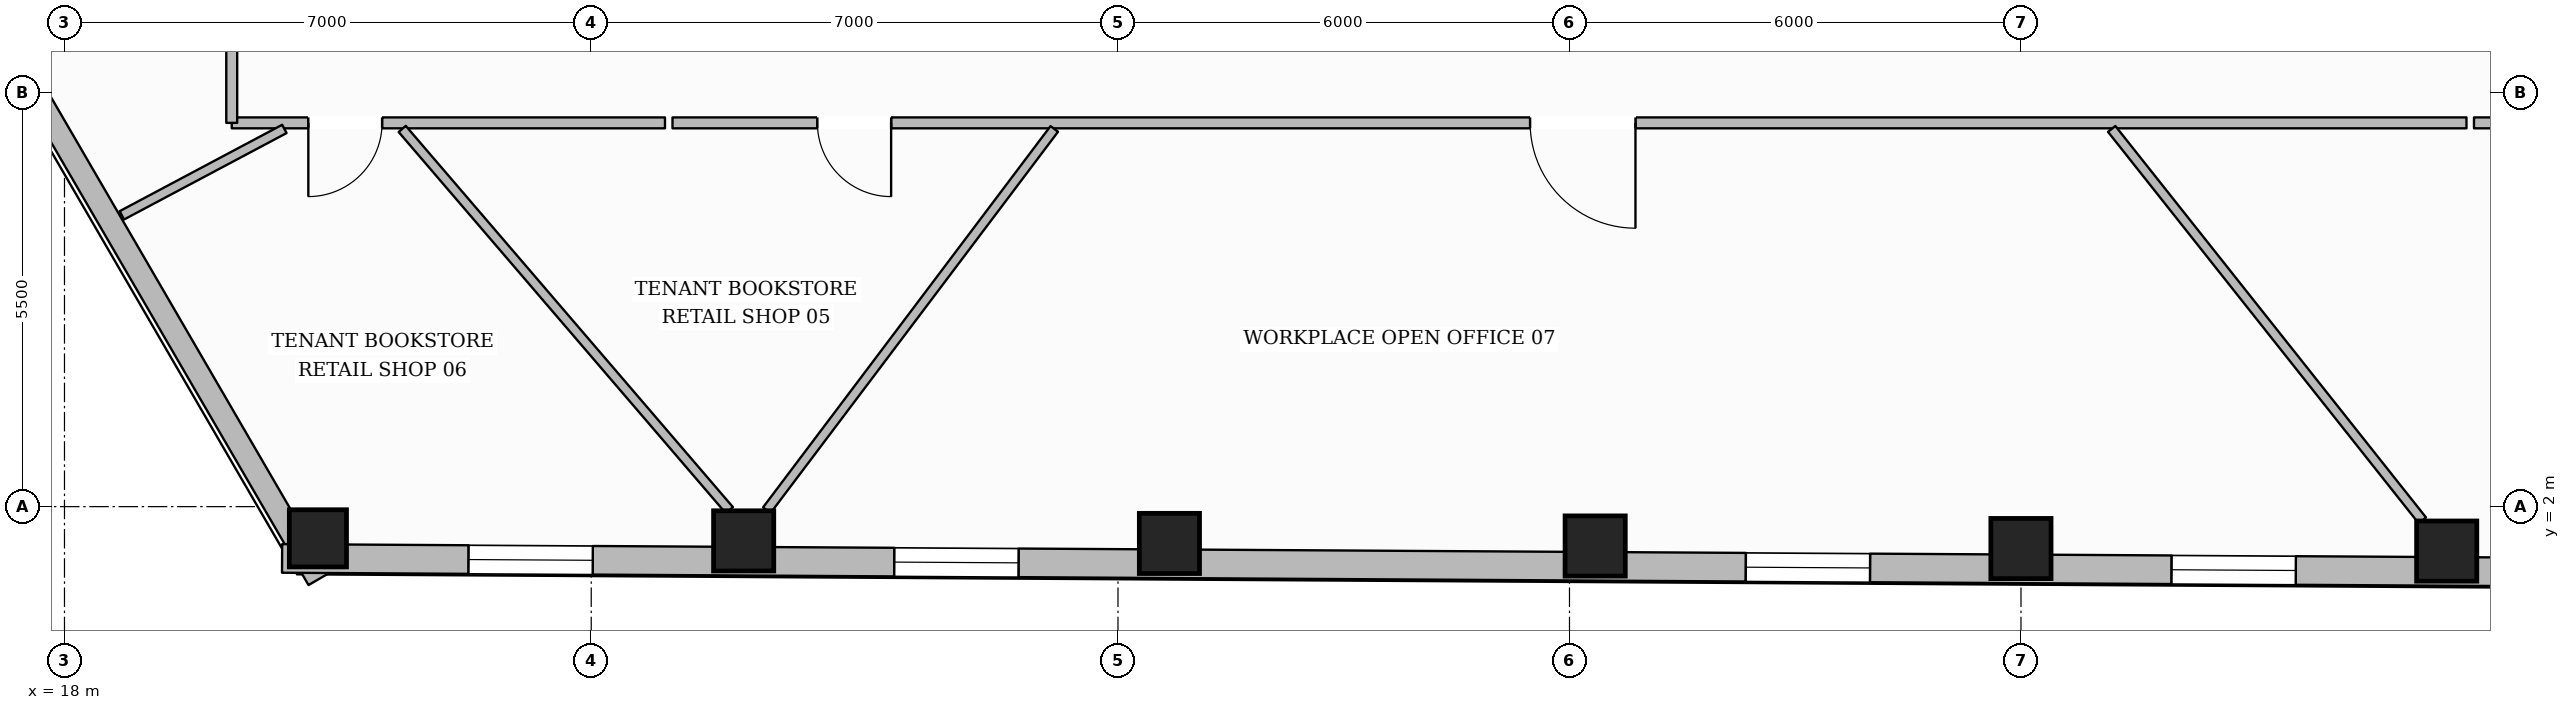
"""IFC4 building model, lengths in metres.
Left out: names, types, materials, properties, quantities, classifications, styles, units other than length and angle.
Written with IfcOpenShell. Run it as: python <this file> out.ifc"""

import sys

from ifc_helpers import new_model, si_unit, direction, frame, frame_2d, origin, origin_2d, place, context, subcontext, project, spatial, rectangle, hollow_rectangle, extrude, element, fill, save


model = new_model("IFC4")
c1 = context("Model", 3, precision=1e-05, world=origin(), true_north=direction((0.0, 1.0)))
c2 = subcontext(c1, "Body", "Model", "MODEL_VIEW")
j1 = project(units=[si_unit("LENGTHUNIT", "METRE"), si_unit("PLANEANGLEUNIT", "RADIAN")], contexts=[c1])
p1 = place(None, origin())
s1 = spatial("IfcSite", under=j1, at=p1, CompositionType="ELEMENT")
p2 = place(p1, origin())
s2 = spatial("IfcBuilding", under=s1, at=p2, CompositionType="ELEMENT")
p3 = place(p2, frame((0.0, 0.0, 44.5)))
s3 = spatial("IfcBuildingStorey", under=s2, at=p3, CompositionType="ELEMENT", Elevation=44.5)
p4 = place(p3, frame((21.368, 1.579, 0.0), z_axis=(0.0, 0.0, 1.0), x_axis=(1.0, 0.0, 0.0)))
e1 = element("IfcColumn", 1, at=p4, inside=s3, PredefinedType="COLUMN", context=c2, shape_type="SweptSolid", body=[
    extrude(hollow_rectangle(XDim=0.76, YDim=0.76, WallThickness=0.035, at=origin_2d()), origin(), (0.0, 0.0, 1.0), 3.59),
])
for number, where, z_axis, x_axis in (
    (2, (27.026, 1.545, 0.0), (0.0, 0.0, 1.0), (1.0, 0.0, 0.0)),
    (3, (32.684, 1.511, 0.0), (0.0, 0.0, 1.0), (1.0, 0.0, 0.0)),
    (4, (38.341, 1.477, 0.0), (0.0, 0.0, 1.0), (1.0, 0.0, 0.0)),
    (5, (44.0, 1.443, 0.0), (0.0, 0.0, 1.0), (1.0, 0.0, 0.0)),
    (6, (49.657, 1.409, 0.0), (0.0, 0.0, 1.0), (1.0, 0.0, 0.0)),
):
    element("IfcColumn", number, at=place(p3, frame(where, z_axis=z_axis, x_axis=x_axis)), inside=s3, PredefinedType="COLUMN", context=c2, shape_type="SweptSolid", body=[
        extrude(hollow_rectangle(XDim=0.8, YDim=0.8, WallThickness=0.036, at=origin_2d()), origin(), (0.0, 0.0, 1.0), 3.59),
    ])
p5 = place(p3, frame((21.373, 1.033, 0.0), z_axis=(0.0, 0.0, 1.0), x_axis=(-0.502582346065, 0.864529343298, 0.0)))
e7 = element("IfcWall", 7, at=p5, inside=s3, PredefinedType="STANDARD", context=c2, shape_type="SweptSolid", body=[
    extrude(rectangle(XDim=16.145, YDim=0.3, at=frame_2d((8.072, 0.0))), origin(), (0.0, 0.0, 1.0), 2.97),
])
p6 = place(p5, frame((7.472, 0.0, 0.65)))
e8 = element("IfcOpeningElement", 8, at=p6, cuts=e7, PredefinedType="OPENING", context=c2, shape_type="SweptSolid", body=[
    extrude(rectangle(XDim=1.2, YDim=1.7, at=frame_2d((0.6, 0.85))), frame((0.0, 0.16, 0.0), z_axis=(0.0, -1.0, 0.0), x_axis=(1.0, 0.0, 0.0)), (0.0, 0.0, 1.0), 0.32),
])
p7 = place(p3, frame((55.794, 1.103, 0.0), z_axis=(0.0, 0.0, 1.0), x_axis=(-0.999982073771, 0.005987665294, 0.0)))
e9 = element("IfcWall", 9, at=p7, inside=s3, PredefinedType="STANDARD", context=c2, shape_type="SweptSolid", body=[
    extrude(rectangle(XDim=34.903, YDim=0.38, at=frame_2d((17.451, 0.0))), origin(), (0.0, 0.0, 1.0), 2.97),
])
p8 = place(p7, frame((30.774, 0.0, 0.65)))
e10 = element("IfcOpeningElement", 10, at=p8, cuts=e9, PredefinedType="OPENING", context=c2, shape_type="SweptSolid", body=[
    extrude(rectangle(XDim=1.65, YDim=1.75, at=frame_2d((0.825, 0.875))), frame((0.0, 0.2, 0.0), z_axis=(0.0, -1.0, 0.0), x_axis=(1.0, 0.0, 0.0)), (0.0, 0.0, 1.0), 0.4),
])
p9 = place(p7, frame((25.116, 0.0, 0.65)))
e11 = element("IfcOpeningElement", 11, at=p9, cuts=e9, PredefinedType="OPENING", context=c2, shape_type="SweptSolid", body=[
    extrude(rectangle(XDim=1.65, YDim=1.75, at=frame_2d((0.825, 0.875))), frame((0.0, 0.2, 0.0), z_axis=(0.0, -1.0, 0.0), x_axis=(1.0, 0.0, 0.0)), (0.0, 0.0, 1.0), 0.4),
])
p10 = place(p7, frame((13.8, 0.0, 0.65)))
e12 = element("IfcOpeningElement", 12, at=p10, cuts=e9, PredefinedType="OPENING", context=c2, shape_type="SweptSolid", body=[
    extrude(rectangle(XDim=1.65, YDim=1.75, at=frame_2d((0.825, 0.875))), frame((0.0, 0.2, 0.0), z_axis=(0.0, -1.0, 0.0), x_axis=(1.0, 0.0, 0.0)), (0.0, 0.0, 1.0), 0.4),
])
p11 = place(p7, frame((8.142, 0.0, 0.65)))
e13 = element("IfcOpeningElement", 13, at=p11, cuts=e9, PredefinedType="OPENING", context=c2, shape_type="SweptSolid", body=[
    extrude(rectangle(XDim=1.65, YDim=1.75, at=frame_2d((0.825, 0.875))), frame((0.0, 0.2, 0.0), z_axis=(0.0, -1.0, 0.0), x_axis=(1.0, 0.0, 0.0)), (0.0, 0.0, 1.0), 0.4),
])
p12 = place(p7, frame((2.484, 0.0, 0.65)))
e14 = element("IfcOpeningElement", 14, at=p12, cuts=e9, PredefinedType="OPENING", context=c2, shape_type="SweptSolid", body=[
    extrude(rectangle(XDim=1.65, YDim=1.75, at=frame_2d((0.825, 0.875))), frame((0.0, 0.2, 0.0), z_axis=(0.0, -1.0, 0.0), x_axis=(1.0, 0.0, 0.0)), (0.0, 0.0, 1.0), 0.4),
])
p13 = place(p3, frame((56.528, 7.1, 0.0), z_axis=(0.0, 0.0, 1.0), x_axis=(-1.0, 0.0, 0.0)))
e15 = element("IfcWall", 15, at=p13, inside=s3, PredefinedType="PARTITIONING", context=c2, shape_type="SweptSolid", body=[
    extrude(rectangle(XDim=6.508, YDim=0.145, at=frame_2d((3.254, 0.0))), origin(), (0.0, 0.0, 1.0), 3.59),
])
p14 = place(p3, frame((49.92, 7.1, 0.0), z_axis=(0.0, 0.0, 1.0), x_axis=(-1.0, 0.0, 0.0)))
e16 = element("IfcWall", 16, at=p14, inside=s3, PredefinedType="PARTITIONING", context=c2, shape_type="SweptSolid", body=[
    extrude(rectangle(XDim=23.84, YDim=0.145, at=frame_2d((11.92, 0.0))), origin(), (0.0, 0.0, 1.0), 3.278),
])
p15 = place(p14, frame((20.935, 0.0, 0.0)))
e17 = element("IfcOpeningElement", 17, at=p15, cuts=e16, PredefinedType="OPENING", context=c2, shape_type="SweptSolid", body=[
    extrude(rectangle(XDim=0.98, YDim=2.15, at=frame_2d((0.49, 1.075))), frame((0.0, 0.083, 0.0), z_axis=(0.0, -1.0, 0.0), x_axis=(1.0, 0.0, 0.0)), (0.0, 0.0, 1.0), 0.165),
])
p16 = place(p14, frame((11.043, 0.0, 0.0)))
e18 = element("IfcOpeningElement", 18, at=p16, cuts=e16, PredefinedType="OPENING", context=c2, shape_type="SweptSolid", body=[
    extrude(rectangle(XDim=1.4, YDim=2.2, at=frame_2d((0.7, 1.1))), frame((0.0, 0.083, 0.0), z_axis=(0.0, -1.0, 0.0), x_axis=(1.0, 0.0, 0.0)), (0.0, 0.0, 1.0), 0.165),
])
p17 = place(p3, frame((25.98, 7.1, 0.0), z_axis=(0.0, 0.0, 1.0), x_axis=(-1.0, 0.0, 0.0)))
e19 = element("IfcWall", 19, at=p17, inside=s3, PredefinedType="PARTITIONING", context=c2, shape_type="SweptSolid", body=[
    extrude(rectangle(XDim=5.757, YDim=0.145, at=frame_2d((2.879, 0.0))), origin(), (0.0, 0.0, 1.0), 3.59),
])
p18 = place(p17, frame((3.76, 0.0, 0.0)))
e20 = element("IfcOpeningElement", 20, at=p18, cuts=e19, PredefinedType="OPENING", context=c2, shape_type="SweptSolid", body=[
    extrude(rectangle(XDim=0.98, YDim=2.15, at=frame_2d((0.49, 1.075))), frame((0.0, 0.083, 0.0), z_axis=(0.0, -1.0, 0.0), x_axis=(1.0, 0.0, 0.0)), (0.0, 0.0, 1.0), 0.165),
])
p19 = place(p3, frame((20.223, 7.1, 0.0), z_axis=(0.0, 0.0, 1.0), x_axis=(0.0, 1.0, 0.0)))
e21 = element("IfcWall", 21, at=p19, inside=s3, PredefinedType="PARTITIONING", context=c2, shape_type="SweptSolid", body=[
    extrude(rectangle(XDim=2.0, YDim=0.145, at=frame_2d((1.0, 0.0))), origin(), (0.0, 0.0, 1.0), 3.59),
])
p20 = place(p3, frame((20.922, 7.02, 0.0), z_axis=(0.0, 0.0, 1.0), x_axis=(-0.882926972808, -0.469510341407, 0.0)))
e22 = element("IfcWall", 22, at=p20, inside=s3, PredefinedType="PARTITIONING", context=c2, shape_type="SweptSolid", body=[
    extrude(rectangle(XDim=2.446, YDim=0.125, at=frame_2d((1.223, 0.0))), origin(), (0.0, 0.0, 1.0), 3.59),
])
p21 = place(p3, frame((31.153, 7.02, 0.0), z_axis=(0.0, 0.0, 1.0), x_axis=(-0.602023418316, -0.79847843039, 0.0)))
e23 = element("IfcWall", 23, at=p21, inside=s3, PredefinedType="PARTITIONING", context=c2, shape_type="SweptSolid", body=[
    extrude(rectangle(XDim=6.345, YDim=0.125, at=frame_2d((3.173, 0.0))), origin(), (0.0, 0.0, 1.0), 3.59),
])
p22 = place(p3, frame((45.206, 7.02, 0.0), z_axis=(0.0, 0.0, 1.0), x_axis=(0.621587684136, -0.783344592712, 0.0)))
e24 = element("IfcWall", 24, at=p22, inside=s3, PredefinedType="PARTITIONING", context=c2, shape_type="SweptSolid", body=[
    extrude(rectangle(XDim=6.641, YDim=0.125, at=frame_2d((3.32, 0.0))), origin(), (0.0, 0.0, 1.0), 3.59),
])
p23 = place(p3, frame((22.488, 7.02, 0.0), z_axis=(0.0, 0.0, 1.0), x_axis=(0.651248981465, -0.758864127588, 0.0)))
e25 = element("IfcWall", 25, at=p23, inside=s3, PredefinedType="PARTITIONING", context=c2, shape_type="SweptSolid", body=[
    extrude(rectangle(XDim=6.677, YDim=0.125, at=frame_2d((3.338, 0.0))), origin(), (0.0, 0.0, 1.0), 3.59),
])
p24 = place(p8, origin())
e26 = element("IfcWindow", 26, at=p24, inside=s3, PartitioningType="SINGLE_PANEL", PredefinedType="WINDOW", context=c2, shape_type="SweptSolid", body=[
    extrude(rectangle(XDim=1.65, YDim=1.75, at=frame_2d((0.825, 0.875))), frame((0.0, 0.03, 0.0), z_axis=(0.0, -1.0, 0.0), x_axis=(1.0, 0.0, 0.0)), (0.0, 0.0, 1.0), 0.06),
])
fill(e10, e26)
p25 = place(p9, origin())
e27 = element("IfcWindow", 27, at=p25, inside=s3, PartitioningType="SINGLE_PANEL", PredefinedType="WINDOW", context=c2, shape_type="SweptSolid", body=[
    extrude(rectangle(XDim=1.65, YDim=1.75, at=frame_2d((0.825, 0.875))), frame((0.0, 0.03, 0.0), z_axis=(0.0, -1.0, 0.0), x_axis=(1.0, 0.0, 0.0)), (0.0, 0.0, 1.0), 0.06),
])
fill(e11, e27)
p26 = place(p10, origin())
e28 = element("IfcWindow", 28, at=p26, inside=s3, PartitioningType="SINGLE_PANEL", PredefinedType="WINDOW", context=c2, shape_type="SweptSolid", body=[
    extrude(rectangle(XDim=1.65, YDim=1.75, at=frame_2d((0.825, 0.875))), frame((0.0, 0.03, 0.0), z_axis=(0.0, -1.0, 0.0), x_axis=(1.0, 0.0, 0.0)), (0.0, 0.0, 1.0), 0.06),
])
fill(e12, e28)
p27 = place(p11, origin())
e29 = element("IfcWindow", 29, at=p27, inside=s3, PartitioningType="SINGLE_PANEL", PredefinedType="WINDOW", context=c2, shape_type="SweptSolid", body=[
    extrude(rectangle(XDim=1.65, YDim=1.75, at=frame_2d((0.825, 0.875))), frame((0.0, 0.03, 0.0), z_axis=(0.0, -1.0, 0.0), x_axis=(1.0, 0.0, 0.0)), (0.0, 0.0, 1.0), 0.06),
])
fill(e13, e29)
p28 = place(p15, origin())
e30 = element("IfcDoor", 30, at=p28, inside=s3, OperationType="SINGLE_SWING_LEFT", PredefinedType="DOOR", context=c2, shape_type="SweptSolid", body=[
    extrude(rectangle(XDim=0.98, YDim=2.15, at=frame_2d((0.49, 1.075))), frame((0.0, 0.025, 0.0), z_axis=(0.0, -1.0, 0.0), x_axis=(1.0, 0.0, 0.0)), (0.0, 0.0, 1.0), 0.05),
])
fill(e17, e30)
p29 = place(p18, origin())
e31 = element("IfcDoor", 31, at=p29, inside=s3, OperationType="SINGLE_SWING_RIGHT", PredefinedType="DOOR", context=c2, shape_type="SweptSolid", body=[
    extrude(rectangle(XDim=0.98, YDim=2.15, at=frame_2d((0.49, 1.075))), frame((0.0, 0.025, 0.0), z_axis=(0.0, -1.0, 0.0), x_axis=(1.0, 0.0, 0.0)), (0.0, 0.0, 1.0), 0.05),
])
fill(e20, e31)
p30 = place(p16, origin())
e32 = element("IfcDoor", 32, at=p30, inside=s3, OperationType="SINGLE_SWING_LEFT", PredefinedType="DOOR", context=c2, shape_type="SweptSolid", body=[
    extrude(rectangle(XDim=1.4, YDim=2.2, at=frame_2d((0.7, 1.1))), frame((0.0, 0.025, 0.0), z_axis=(0.0, -1.0, 0.0), x_axis=(1.0, 0.0, 0.0)), (0.0, 0.0, 1.0), 0.05),
])
fill(e18, e32)
save(model, sys.argv[1])
